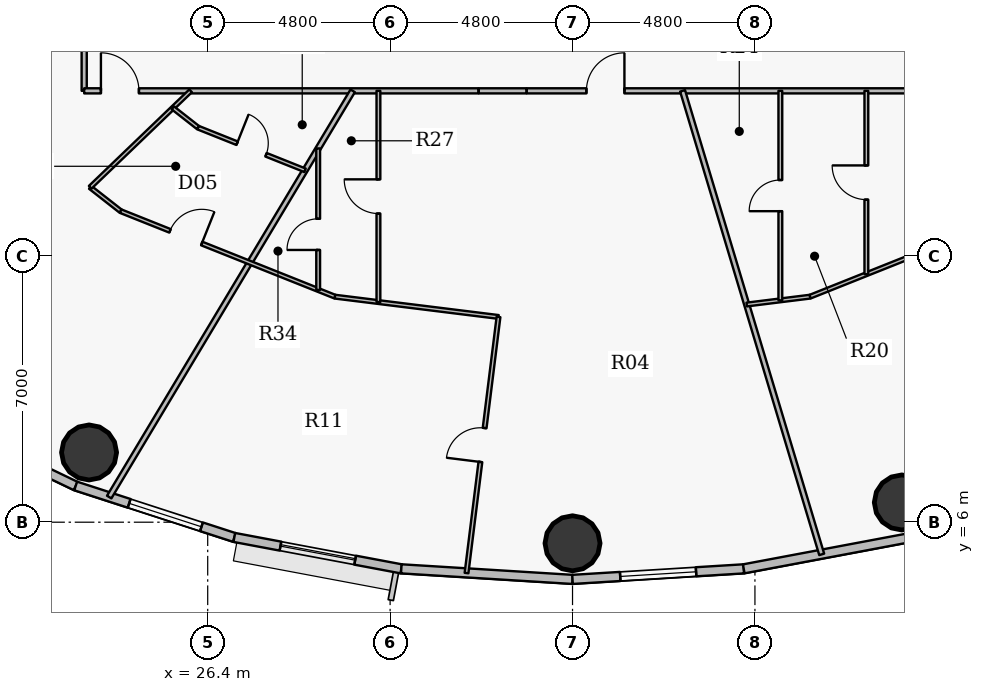
"""IFC4 building model, lengths in metres.
Left out: names, types, materials, properties, quantities, classifications, styles, units other than length and angle.
Written with IfcOpenShell. Run it as: python <this file> out.ifc"""

import sys

from ifc_helpers import new_model, si_unit, direction, frame, frame_2d, origin, origin_2d, place, context, subcontext, project, spatial, rectangle, hollow_circle, extrude, source, transform, mapped, element, fill, save


model = new_model("IFC4")
c1 = context("Model", 3, precision=1e-05, world=origin(), true_north=direction((0.0, 1.0)))
c2 = subcontext(c1, "Body", "Model", "MODEL_VIEW")
j1 = project(units=[si_unit("LENGTHUNIT", "METRE"), si_unit("PLANEANGLEUNIT", "RADIAN")], contexts=[c1])
p1 = place(None, origin())
s1 = spatial("IfcSite", under=j1, at=p1, CompositionType="ELEMENT")
p2 = place(p1, origin())
s2 = spatial("IfcBuilding", under=s1, at=p2, CompositionType="ELEMENT")
p3 = place(p2, frame((0.0, 0.0, 104.7)))
s3 = spatial("IfcBuildingStorey", under=s2, at=p3, CompositionType="ELEMENT", Elevation=104.7)
for number, where, z_axis, x_axis in (
    (1, (23.278, 7.835, 0.0), (0.0, 0.0, 1.0), (1.0, 0.0, 0.0)),
    (2, (36.0, 5.445, 0.0), (0.0, 0.0, 1.0), (1.0, 0.0, 0.0)),
    (3, (44.666, 6.519, 0.0), (0.0, 0.0, 1.0), (1.0, 0.0, 0.0)),
):
    element("IfcColumn", number, at=place(p3, frame(where, z_axis=z_axis, x_axis=x_axis)), inside=s3, PredefinedType="COLUMN", context=c2, shape_type="SweptSolid", body=[
        extrude(hollow_circle(Radius=0.725, WallThickness=0.042, at=origin_2d()), origin(), (0.0, 0.0, 1.0), 3.75),
    ])
p4 = place(p3, frame((22.926, 6.953, 0.0), z_axis=(0.0, 0.0, 1.0), x_axis=(-0.901589935876, 0.432591709962, 0.0)))
e4 = element("IfcWall", 4, at=p4, inside=s3, PredefinedType="SOLIDWALL", context=c2, shape_type="SweptSolid", body=[
    extrude(rectangle(XDim=4.272, YDim=0.24, at=frame_2d((2.136, 0.0))), origin(), (0.0, 0.0, 1.0), 3.5),
])
p5 = place(p4, frame((1.136, 0.0, 0.9)))
e5 = element("IfcOpeningElement", 5, at=p5, cuts=e4, PredefinedType="OPENING", context=c2, shape_type="SweptSolid", body=[
    extrude(rectangle(XDim=2.0, YDim=1.75, at=origin_2d()), frame((1.0, 0.13, 0.875), z_axis=(0.0, -1.0, 0.0), x_axis=(1.0, 0.0, 0.0)), (0.0, 0.0, 1.0), 0.26),
])
p6 = place(p3, frame((27.1, 5.599, 0.0), z_axis=(0.0, 0.0, 1.0), x_axis=(-0.951211346073, 0.308540070495, 0.0)))
e6 = element("IfcWall", 6, at=p6, inside=s3, PredefinedType="SOLIDWALL", context=c2, shape_type="SweptSolid", body=[
    extrude(rectangle(XDim=4.388, YDim=0.24, at=frame_2d((2.194, 0.0))), origin(), (0.0, 0.0, 1.0), 3.5),
])
p7 = place(p6, frame((0.909, 0.0, 0.9)))
e7 = element("IfcOpeningElement", 7, at=p7, cuts=e6, PredefinedType="OPENING", context=c2, shape_type="SweptSolid", body=[
    extrude(rectangle(XDim=2.0, YDim=1.75, at=origin_2d()), frame((1.0, 0.13, 0.875), z_axis=(0.0, -1.0, 0.0), x_axis=(1.0, 0.0, 0.0)), (0.0, 0.0, 1.0), 0.26),
])
p8 = place(p3, frame((31.494, 4.773, 0.0), z_axis=(0.0, 0.0, 1.0), x_axis=(-0.982789252177, 0.184730305596, 0.0)))
e8 = element("IfcWall", 8, at=p8, inside=s3, PredefinedType="SOLIDWALL", context=c2, shape_type="SweptSolid", body=[
    extrude(rectangle(XDim=4.471, YDim=0.24, at=frame_2d((2.235, 0.0))), origin(), (0.0, 0.0, 1.0), 3.5),
])
p9 = place(p8, frame((1.236, 0.0, 0.9)))
e9 = element("IfcOpeningElement", 9, at=p9, cuts=e8, PredefinedType="OPENING", context=c2, shape_type="SweptSolid", body=[
    extrude(rectangle(XDim=2.0, YDim=1.75, at=origin_2d()), frame((1.0, 0.13, 0.875), z_axis=(0.0, -1.0, 0.0), x_axis=(1.0, 0.0, 0.0)), (0.0, 0.0, 1.0), 0.26),
])
p10 = place(p3, frame((36.0, 4.495, 0.0), z_axis=(0.0, 0.0, 1.0), x_axis=(-0.998107531589, 0.061492726276, 0.0)))
e10 = element("IfcWall", 10, at=p10, inside=s3, PredefinedType="SOLIDWALL", context=c2, shape_type="SweptSolid", body=[
    extrude(rectangle(XDim=4.514, YDim=0.24, at=frame_2d((2.257, 0.0))), origin(), (0.0, 0.0, 1.0), 3.5),
])
p11 = place(p3, frame((40.506, 4.773, 0.0), z_axis=(0.0, 0.0, 1.0), x_axis=(-0.998107531589, -0.061492726276, 0.0)))
e11 = element("IfcWall", 11, at=p11, inside=s3, PredefinedType="SOLIDWALL", context=c2, shape_type="SweptSolid", body=[
    extrude(rectangle(XDim=4.514, YDim=0.24, at=frame_2d((2.257, 0.0))), origin(), (0.0, 0.0, 1.0), 3.5),
])
p12 = place(p11, frame((1.257, 0.0, 0.9)))
e12 = element("IfcOpeningElement", 12, at=p12, cuts=e11, PredefinedType="OPENING", context=c2, shape_type="SweptSolid", body=[
    extrude(rectangle(XDim=2.0, YDim=1.75, at=origin_2d()), frame((1.0, 0.13, 0.875), z_axis=(0.0, -1.0, 0.0), x_axis=(1.0, 0.0, 0.0)), (0.0, 0.0, 1.0), 0.26),
])
p13 = place(p3, frame((44.9, 5.599, 0.0), z_axis=(0.0, 0.0, 1.0), x_axis=(-0.982789252177, -0.184730305596, 0.0)))
e13 = element("IfcWall", 13, at=p13, inside=s3, PredefinedType="SOLIDWALL", context=c2, shape_type="SweptSolid", body=[
    extrude(rectangle(XDim=4.471, YDim=0.24, at=frame_2d((2.235, 0.0))), origin(), (0.0, 0.0, 1.0), 3.5),
])
p14 = place(p3, frame((12.427, 14.138, 0.0), z_axis=(0.0, 0.0, 1.0), x_axis=(0.877835987922, 0.47896135367, 0.0)))
e14 = element("IfcWall", 14, at=p14, inside=s3, PredefinedType="PARTITIONING", context=c2, shape_type="SweptSolid", body=[
    extrude(rectangle(XDim=12.215, YDim=0.135, at=frame_2d((6.107, 0.0))), origin(), (0.0, 0.0, 1.0), 2.935),
])
p15 = place(p3, frame((23.15, 17.35, 0.0), z_axis=(0.0, 0.0, 1.0), x_axis=(0.0, 1.0, 0.0)))
e15 = element("IfcWall", 15, at=p15, inside=s3, PredefinedType="PARTITIONING", context=c2, shape_type="SweptSolid", body=[
    extrude(rectangle(XDim=19.3, YDim=0.135, at=frame_2d((9.65, 0.0))), origin(), (0.0, 0.0, 1.0), 2.935),
])
p16 = place(p15, frame((7.86, 0.0, 0.0)))
e16 = element("IfcOpeningElement", 16, at=p16, cuts=e15, PredefinedType="OPENING", context=c2, shape_type="SweptSolid", body=[
    extrude(rectangle(XDim=1.0, YDim=2.15, at=origin_2d()), frame((0.5, 0.078, 1.075), z_axis=(0.0, -1.0, 0.0), x_axis=(1.0, 0.0, 0.0)), (0.0, 0.0, 1.0), 0.155),
])
p17 = place(p3, frame((23.15, 17.35, 0.0), z_axis=(0.0, 0.0, 1.0), x_axis=(1.0, 0.0, 0.0)))
e17 = element("IfcWall", 17, at=p17, inside=s3, PredefinedType="PARTITIONING", context=c2, shape_type="SweptSolid", body=[
    extrude(rectangle(XDim=10.373, YDim=0.135, at=frame_2d((5.187, 0.0))), origin(), (0.0, 0.0, 1.0), 2.935),
])
p18 = place(p17, frame((0.44, 0.0, 0.0)))
e18 = element("IfcOpeningElement", 18, at=p18, cuts=e17, PredefinedType="OPENING", context=c2, shape_type="SweptSolid", body=[
    extrude(rectangle(XDim=1.0, YDim=2.15, at=origin_2d()), frame((0.5, 0.078, 1.075), z_axis=(0.0, -1.0, 0.0), x_axis=(1.0, 0.0, 0.0)), (0.0, 0.0, 1.0), 0.155),
])
p19 = place(p3, frame((23.307, 14.812, 0.0), z_axis=(0.0, 0.0, 1.0), x_axis=(0.787398737985, -0.616444018075, 0.0)))
e19 = element("IfcWall", 19, at=p19, inside=s3, PredefinedType="PARTITIONING", context=c2, shape_type="SweptSolid", body=[
    extrude(rectangle(XDim=1.018, YDim=0.1, at=frame_2d((0.509, 0.0))), origin(), (0.0, 0.0, 1.0), 3.085),
])
p20 = place(p3, frame((23.307, 14.812, 0.0), z_axis=(0.0, 0.0, 1.0), x_axis=(0.721286127108, 0.692637223113, 0.0)))
e20 = element("IfcWall", 20, at=p20, inside=s3, PredefinedType="PARTITIONING", context=c2, shape_type="SweptSolid", body=[
    extrude(rectangle(XDim=3.664, YDim=0.1, at=frame_2d((1.832, 0.0))), origin(), (0.0, 0.0, 1.0), 3.5),
])
p21 = place(p3, frame((23.808, 6.661, 0.0), z_axis=(0.0, 0.0, 1.0), x_axis=(0.51416439954, 0.857691652195, 0.0)))
e21 = element("IfcWall", 21, at=p21, inside=s3, PredefinedType="PARTITIONING", context=c2, shape_type="SweptSolid", body=[
    extrude(rectangle(XDim=12.462, YDim=0.135, at=frame_2d((6.231, 0.0))), origin(), (0.0, 0.0, 1.0), 2.935),
])
p22 = place(p3, frame((24.109, 14.184, 0.0), z_axis=(0.0, 0.0, 1.0), x_axis=(0.9288090756, -0.370558633798, 0.0)))
e22 = element("IfcWall", 22, at=p22, inside=s3, PredefinedType="PARTITIONING", context=c2, shape_type="SweptSolid", body=[
    extrude(rectangle(XDim=6.072, YDim=0.1, at=frame_2d((3.036, 0.0))), origin(), (0.0, 0.0, 1.0), 2.935),
])
p23 = place(p22, frame((1.398, 0.0, 0.0)))
e23 = element("IfcOpeningElement", 23, at=p23, cuts=e22, PredefinedType="OPENING", context=c2, shape_type="SweptSolid", body=[
    extrude(rectangle(XDim=0.9, YDim=2.1, at=origin_2d()), frame((0.45, 0.06, 1.05), z_axis=(0.0, -1.0, 0.0), x_axis=(1.0, 0.0, 0.0)), (0.0, 0.0, 1.0), 0.12),
])
p24 = place(p3, frame((25.483, 16.901, 0.0), z_axis=(0.0, 0.0, 1.0), x_axis=(0.787321722918, -0.616542378609, 0.0)))
e24 = element("IfcWall", 24, at=p24, inside=s3, PredefinedType="PARTITIONING", context=c2, shape_type="SweptSolid", body=[
    extrude(rectangle(XDim=0.844, YDim=0.1, at=frame_2d((0.422, 0.0))), origin(), (0.0, 0.0, 1.0), 3.5),
])
p25 = place(p3, frame((26.147, 16.381, 0.0), z_axis=(0.0, 0.0, 1.0), x_axis=(0.928793125476, -0.370598610451, 0.0)))
e25 = element("IfcWall", 25, at=p25, inside=s3, PredefinedType="PARTITIONING", context=c2, shape_type="SweptSolid", body=[
    extrude(rectangle(XDim=3.03, YDim=0.1, at=frame_2d((1.515, 0.0))), origin(), (0.0, 0.0, 1.0), 2.935),
])
p26 = place(p25, frame((1.105, 0.0, 0.0)))
e26 = element("IfcOpeningElement", 26, at=p26, cuts=e25, PredefinedType="OPENING", context=c2, shape_type="SweptSolid", body=[
    extrude(rectangle(XDim=0.82, YDim=2.1, at=origin_2d()), frame((0.41, 0.06, 1.05), z_axis=(0.0, -1.0, 0.0), x_axis=(1.0, 0.0, 0.0)), (0.0, 0.0, 1.0), 0.12),
])
p27 = place(p3, frame((29.307, 12.111, 0.0), z_axis=(0.0, 0.0, 1.0), x_axis=(0.0, 1.0, 0.0)))
e27 = element("IfcWall", 27, at=p27, inside=s3, PredefinedType="PARTITIONING", context=c2, shape_type="SweptSolid", body=[
    extrude(rectangle(XDim=3.724, YDim=0.1, at=frame_2d((1.862, 0.0))), origin(), (0.0, 0.0, 1.0), 3.5),
])
p28 = place(p27, frame((1.052, 0.0, 0.0)))
e28 = element("IfcOpeningElement", 28, at=p28, cuts=e27, PredefinedType="OPENING", context=c2, shape_type="SweptSolid", body=[
    extrude(rectangle(XDim=0.82, YDim=2.1, at=origin_2d()), frame((0.41, 0.06, 1.05), z_axis=(0.0, -1.0, 0.0), x_axis=(1.0, 0.0, 0.0)), (0.0, 0.0, 1.0), 0.12),
])
p29 = place(p3, frame((29.749, 11.934, 0.0), z_axis=(0.0, 0.0, 1.0), x_axis=(0.992398657051, -0.123064639455, 0.0)))
e29 = element("IfcWall", 29, at=p29, inside=s3, PredefinedType="PARTITIONING", context=c2, shape_type="SweptSolid", body=[
    extrude(rectangle(XDim=4.337, YDim=0.1, at=frame_2d((2.168, 0.0))), origin(), (0.0, 0.0, 1.0), 3.5),
])
p30 = place(p3, frame((30.892, 11.792, 0.0), z_axis=(0.0, 0.0, 1.0), x_axis=(0.0, 1.0, 0.0)))
e30 = element("IfcWall", 30, at=p30, inside=s3, PredefinedType="PARTITIONING", context=c2, shape_type="SweptSolid", body=[
    extrude(rectangle(XDim=5.558, YDim=0.1, at=frame_2d((2.779, 0.0))), origin(), (0.0, 0.0, 1.0), 3.5),
])
p31 = place(p30, frame((2.329, 0.0, 0.0)))
e31 = element("IfcOpeningElement", 31, at=p31, cuts=e30, PredefinedType="OPENING", context=c2, shape_type="SweptSolid", body=[
    extrude(rectangle(XDim=0.9, YDim=2.1, at=origin_2d()), frame((0.45, 0.06, 1.05), z_axis=(0.0, -1.0, 0.0), x_axis=(1.0, 0.0, 0.0)), (0.0, 0.0, 1.0), 0.12),
])
p32 = place(p3, frame((33.211, 4.662, 0.0), z_axis=(0.0, 0.0, 1.0), x_axis=(0.123884295517, 0.992296670016, 0.0)))
e32 = element("IfcWall", 32, at=p32, inside=s3, PredefinedType="PARTITIONING", context=c2, shape_type="SweptSolid", body=[
    extrude(rectangle(XDim=6.791, YDim=0.1, at=frame_2d((3.396, 0.0))), origin(), (0.0, 0.0, 1.0), 2.935),
])
p33 = place(p32, frame((2.946, 0.0, 0.0)))
e33 = element("IfcOpeningElement", 33, at=p33, cuts=e32, PredefinedType="OPENING", context=c2, shape_type="SweptSolid", body=[
    extrude(rectangle(XDim=0.9, YDim=2.1, at=origin_2d()), frame((0.45, 0.06, 1.05), z_axis=(0.0, -1.0, 0.0), x_axis=(1.0, 0.0, 0.0)), (0.0, 0.0, 1.0), 0.12),
])
p34 = place(p3, frame((34.795, 17.35, 0.0), z_axis=(0.0, 0.0, 1.0), x_axis=(1.0, 0.0, 0.0)))
e34 = element("IfcWall", 34, at=p34, inside=s3, PredefinedType="PARTITIONING", context=c2, shape_type="SweptSolid", body=[
    extrude(rectangle(XDim=14.055, YDim=0.135, at=frame_2d((7.028, 0.0))), origin(), (0.0, 0.0, 1.0), 2.935),
])
p35 = place(p34, frame((1.571, 0.0, 0.0)))
e35 = element("IfcOpeningElement", 35, at=p35, cuts=e34, PredefinedType="OPENING", context=c2, shape_type="SweptSolid", body=[
    extrude(rectangle(XDim=1.0, YDim=2.15, at=origin_2d()), frame((0.5, 0.078, 1.075), z_axis=(0.0, -1.0, 0.0), x_axis=(1.0, 0.0, 0.0)), (0.0, 0.0, 1.0), 0.155),
])
p36 = place(p34, frame((10.976, 0.0, 0.0)))
e36 = element("IfcOpeningElement", 36, at=p36, cuts=e34, PredefinedType="OPENING", context=c2, shape_type="SweptSolid", body=[
    extrude(rectangle(XDim=1.0, YDim=2.15, at=origin_2d()), frame((0.5, 0.078, 1.075), z_axis=(0.0, -1.0, 0.0), x_axis=(1.0, 0.0, 0.0)), (0.0, 0.0, 1.0), 0.155),
])
p37 = place(p3, frame((38.896, 17.35, 0.0), z_axis=(0.0, 0.0, 1.0), x_axis=(0.287463970392, -0.957791452105, 0.0)))
e37 = element("IfcWall", 37, at=p37, inside=s3, PredefinedType="PARTITIONING", context=c2, shape_type="SweptSolid", body=[
    extrude(rectangle(XDim=12.734, YDim=0.135, at=frame_2d((6.367, 0.0))), origin(), (0.0, 0.0, 1.0), 2.935),
])
p38 = place(p3, frame((40.584, 11.728, 0.0), z_axis=(0.0, 0.0, 1.0), x_axis=(0.992400317705, 0.123051247123, 0.0)))
e38 = element("IfcWall", 38, at=p38, inside=s3, PredefinedType="PARTITIONING", context=c2, shape_type="SweptSolid", body=[
    extrude(rectangle(XDim=1.68, YDim=0.1, at=frame_2d((0.84, 0.0))), origin(), (0.0, 0.0, 1.0), 2.935),
])
p39 = place(p3, frame((41.469, 11.837, 0.0), z_axis=(0.0, 0.0, 1.0), x_axis=(0.0, 1.0, 0.0)))
e39 = element("IfcWall", 39, at=p39, inside=s3, PredefinedType="PARTITIONING", context=c2, shape_type="SweptSolid", body=[
    extrude(rectangle(XDim=5.513, YDim=0.1, at=frame_2d((2.756, 0.0))), origin(), (0.0, 0.0, 1.0), 2.935),
])
p40 = place(p39, frame((2.346, 0.0, 0.0)))
e40 = element("IfcOpeningElement", 40, at=p40, cuts=e39, PredefinedType="OPENING", context=c2, shape_type="SweptSolid", body=[
    extrude(rectangle(XDim=0.82, YDim=2.1, at=origin_2d()), frame((0.41, 0.06, 1.05), z_axis=(0.0, -1.0, 0.0), x_axis=(1.0, 0.0, 0.0)), (0.0, 0.0, 1.0), 0.12),
])
p41 = place(p3, frame((42.251, 11.934, 0.0), z_axis=(0.0, 0.0, 1.0), x_axis=(0.928805351872, 0.370567967226, 0.0)))
e41 = element("IfcWall", 41, at=p41, inside=s3, PredefinedType="PARTITIONING", context=c2, shape_type="SweptSolid", body=[
    extrude(rectangle(XDim=5.322, YDim=0.1, at=frame_2d((2.661, 0.0))), origin(), (0.0, 0.0, 1.0), 2.935),
])
p42 = place(p3, frame((43.732, 12.525, 0.0), z_axis=(0.0, 0.0, 1.0), x_axis=(0.0, 1.0, 0.0)))
e42 = element("IfcWall", 42, at=p42, inside=s3, PredefinedType="PARTITIONING", context=c2, shape_type="SweptSolid", body=[
    extrude(rectangle(XDim=4.825, YDim=0.1, at=frame_2d((2.413, 0.0))), origin(), (0.0, 0.0, 1.0), 3.5),
])
p43 = place(p42, frame((1.962, 0.0, 0.0)))
e43 = element("IfcOpeningElement", 43, at=p43, cuts=e42, PredefinedType="OPENING", context=c2, shape_type="SweptSolid", body=[
    extrude(rectangle(XDim=0.9, YDim=2.1, at=origin_2d()), frame((0.45, 0.06, 1.05), z_axis=(0.0, -1.0, 0.0), x_axis=(1.0, 0.0, 0.0)), (0.0, 0.0, 1.0), 0.12),
])
p44 = place(p3, frame((34.785, 17.35, 0.0), z_axis=(0.0, 0.0, 1.0), x_axis=(-1.0, 0.0, 0.0)))
e44 = element("IfcWall", 44, at=p44, inside=s3, PredefinedType="PARTITIONING", context=c2, shape_type="SweptSolid", body=[
    extrude(rectangle(XDim=1.252, YDim=0.135, at=frame_2d((0.626, 0.0))), origin(), (0.0, 0.0, 1.0), 3.5),
])
m1 = source(origin(), c2, "Body", "SweptSolid", [
    extrude(rectangle(XDim=2.0, YDim=1.75, at=origin_2d()), frame((1.0, 0.03, 0.875), z_axis=(0.0, -1.0, 0.0), x_axis=(1.0, 0.0, 0.0)), (0.0, 0.0, 1.0), 0.06),
])
p45 = place(p7, origin())
e45 = element("IfcWindow", 45, at=p45, inside=s3, PartitioningType="DOUBLE_PANEL_VERTICAL", PredefinedType="WINDOW", context=c2, shape_type="MappedRepresentation", body=[
    mapped(m1, transform((0.0, 0.0, 0.0), x_axis=(1.0, 0.0, 0.0), y_axis=(0.0, 1.0, 0.0), z_axis=(0.0, 0.0, 1.0), scale=1.0)),
])
fill(e7, e45)
p46 = place(p9, origin())
e46 = element("IfcWindow", 46, at=p46, inside=s3, PartitioningType="DOUBLE_PANEL_VERTICAL", PredefinedType="WINDOW", context=c2, shape_type="MappedRepresentation", body=[
    mapped(m1, transform((0.0, 0.0, 0.0), x_axis=(1.0, 0.0, 0.0), y_axis=(0.0, 1.0, 0.0), z_axis=(0.0, 0.0, 1.0), scale=1.0)),
])
fill(e9, e46)
p47 = place(p12, origin())
e47 = element("IfcWindow", 47, at=p47, inside=s3, PartitioningType="DOUBLE_PANEL_VERTICAL", PredefinedType="WINDOW", context=c2, shape_type="MappedRepresentation", body=[
    mapped(m1, transform((0.0, 0.0, 0.0), x_axis=(1.0, 0.0, 0.0), y_axis=(0.0, 1.0, 0.0), z_axis=(0.0, 0.0, 1.0), scale=1.0)),
])
fill(e12, e47)
m2 = source(origin(), c2, "Body", "SweptSolid", [
    extrude(rectangle(XDim=1.0, YDim=2.15, at=origin_2d()), frame((0.5, 0.025, 1.075), z_axis=(0.0, -1.0, 0.0), x_axis=(1.0, 0.0, 0.0)), (0.0, 0.0, 1.0), 0.05),
])
p48 = place(p18, origin())
e48 = element("IfcDoor", 48, at=p48, inside=s3, OperationType="SINGLE_SWING_LEFT", PredefinedType="DOOR", context=c2, shape_type="MappedRepresentation", body=[
    mapped(m2, transform((0.0, 0.0, 0.0), x_axis=(1.0, 0.0, 0.0), y_axis=(0.0, 1.0, 0.0), z_axis=(0.0, 0.0, 1.0), scale=1.0)),
])
fill(e18, e48)
m3 = source(origin(), c2, "Body", "SweptSolid", [
    extrude(rectangle(XDim=0.9, YDim=2.1, at=origin_2d()), frame((0.45, 0.025, 1.05), z_axis=(0.0, -1.0, 0.0), x_axis=(1.0, 0.0, 0.0)), (0.0, 0.0, 1.0), 0.05),
])
p49 = place(p23, origin())
e49 = element("IfcDoor", 49, at=p49, inside=s3, OperationType="SINGLE_SWING_RIGHT", PredefinedType="DOOR", context=c2, shape_type="MappedRepresentation", body=[
    mapped(m3, transform((0.0, 0.0, 0.0), x_axis=(1.0, 0.0, 0.0), y_axis=(0.0, 1.0, 0.0), z_axis=(0.0, 0.0, 1.0), scale=1.0)),
])
fill(e23, e49)
m4 = source(origin(), c2, "Body", "SweptSolid", [
    extrude(rectangle(XDim=0.82, YDim=2.1, at=origin_2d()), frame((0.41, 0.025, 1.05), z_axis=(0.0, -1.0, 0.0), x_axis=(1.0, 0.0, 0.0)), (0.0, 0.0, 1.0), 0.05),
])
p50 = place(p26, origin())
e50 = element("IfcDoor", 50, at=p50, inside=s3, OperationType="SINGLE_SWING_LEFT", PredefinedType="DOOR", context=c2, shape_type="MappedRepresentation", body=[
    mapped(m4, transform((0.0, 0.0, 0.0), x_axis=(1.0, 0.0, 0.0), y_axis=(0.0, 1.0, 0.0), z_axis=(0.0, 0.0, 1.0), scale=1.0)),
])
fill(e26, e50)
p51 = place(p35, origin())
e51 = element("IfcDoor", 51, at=p51, inside=s3, OperationType="SINGLE_SWING_RIGHT", PredefinedType="DOOR", context=c2, shape_type="MappedRepresentation", body=[
    mapped(m2, transform((0.0, 0.0, 0.0), x_axis=(1.0, 0.0, 0.0), y_axis=(0.0, 1.0, 0.0), z_axis=(0.0, 0.0, 1.0), scale=1.0)),
])
fill(e35, e51)
p52 = place(p33, origin())
e52 = element("IfcDoor", 52, at=p52, inside=s3, OperationType="SINGLE_SWING_LEFT", PredefinedType="DOOR", context=c2, shape_type="MappedRepresentation", body=[
    mapped(m3, transform((0.0, 0.0, 0.0), x_axis=(1.0, 0.0, 0.0), y_axis=(0.0, 1.0, 0.0), z_axis=(0.0, 0.0, 1.0), scale=1.0)),
])
fill(e33, e52)
p53 = place(p31, origin())
e53 = element("IfcDoor", 53, at=p53, inside=s3, OperationType="SINGLE_SWING_RIGHT", PredefinedType="DOOR", context=c2, shape_type="MappedRepresentation", body=[
    mapped(m3, transform((0.0, 0.0, 0.0), x_axis=(1.0, 0.0, 0.0), y_axis=(0.0, 1.0, 0.0), z_axis=(0.0, 0.0, 1.0), scale=1.0)),
])
fill(e31, e53)
p54 = place(p28, origin())
e54 = element("IfcDoor", 54, at=p54, inside=s3, OperationType="SINGLE_SWING_LEFT", PredefinedType="DOOR", context=c2, shape_type="MappedRepresentation", body=[
    mapped(m4, transform((0.0, 0.0, 0.0), x_axis=(1.0, 0.0, 0.0), y_axis=(0.0, 1.0, 0.0), z_axis=(0.0, 0.0, 1.0), scale=1.0)),
])
fill(e28, e54)
p55 = place(p43, origin())
e55 = element("IfcDoor", 55, at=p55, inside=s3, OperationType="SINGLE_SWING_RIGHT", PredefinedType="DOOR", context=c2, shape_type="MappedRepresentation", body=[
    mapped(m3, transform((0.0, 0.0, 0.0), x_axis=(1.0, 0.0, 0.0), y_axis=(0.0, 1.0, 0.0), z_axis=(0.0, 0.0, 1.0), scale=1.0)),
])
fill(e43, e55)
p56 = place(p40, origin())
e56 = element("IfcDoor", 56, at=p56, inside=s3, OperationType="SINGLE_SWING_LEFT", PredefinedType="DOOR", context=c2, shape_type="MappedRepresentation", body=[
    mapped(m4, transform((0.0, 0.0, 0.0), x_axis=(1.0, 0.0, 0.0), y_axis=(0.0, 1.0, 0.0), z_axis=(0.0, 0.0, 1.0), scale=1.0)),
])
fill(e40, e56)
save(model, sys.argv[1])
